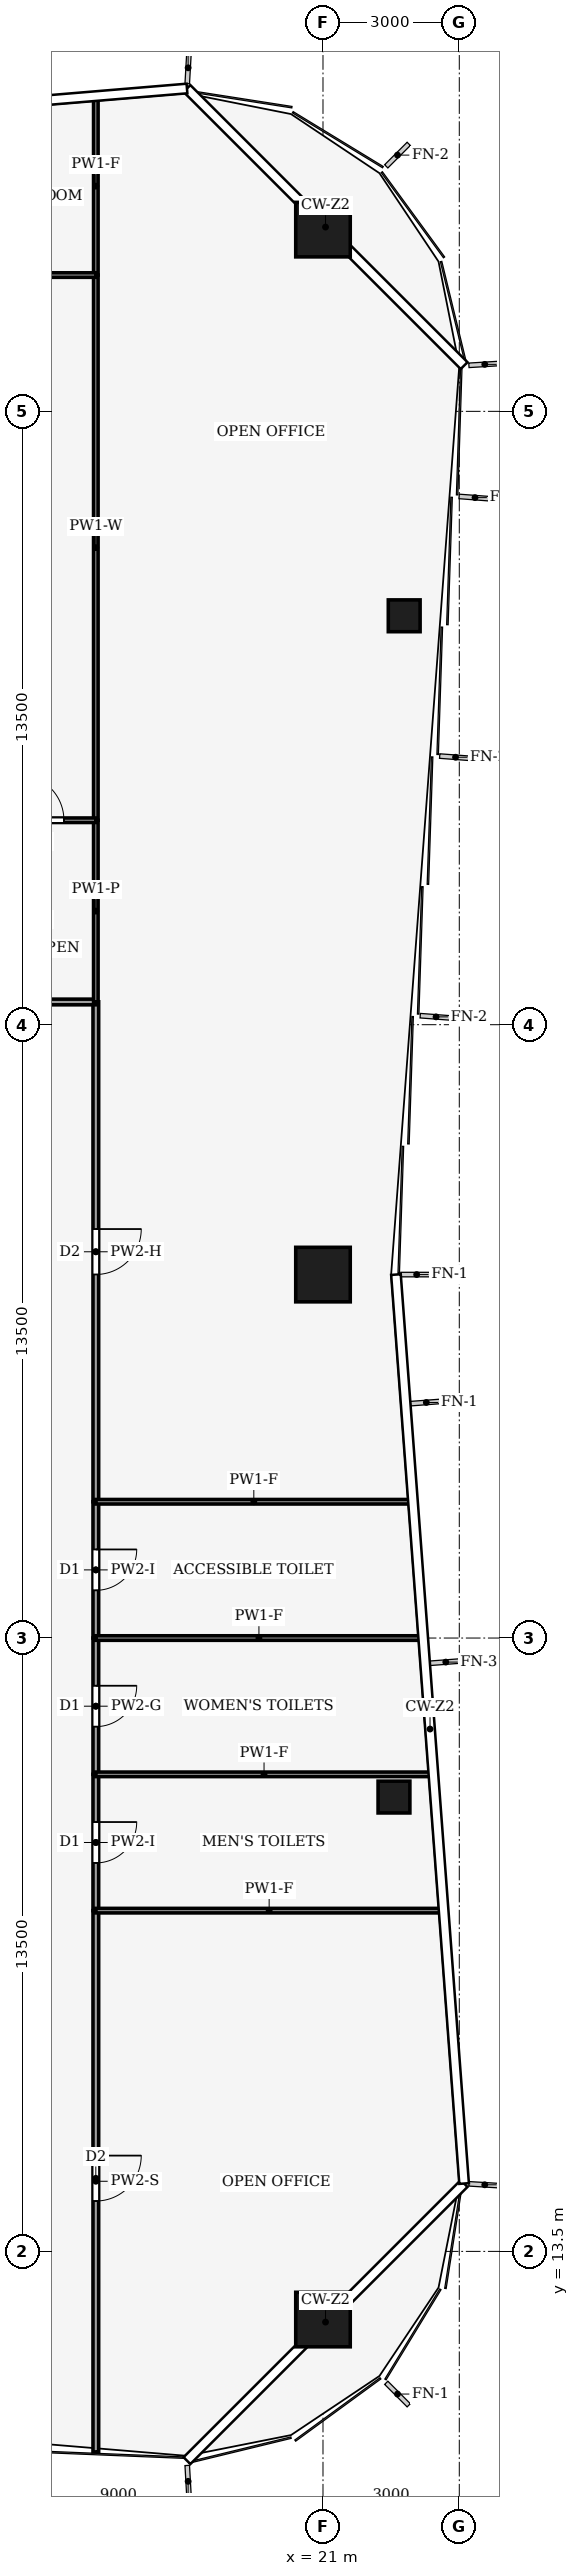
"""IFC4 building model, lengths in metres.
Left out: names, types, materials, properties, quantities, classifications, styles, units other than length and angle.
Written with IfcOpenShell. Run it as: python <this file> out.ifc"""

import sys

from ifc_helpers import new_model, si_unit, direction, frame, frame_2d, origin, origin_2d, place, context, subcontext, project, spatial, rectangle, hollow_rectangle, extrude, element, fill, save


model = new_model("IFC4")
c1 = context("Model", 3, precision=1e-05, world=origin(), true_north=direction((0.0, 1.0)))
c2 = subcontext(c1, "Body", "Model", "MODEL_VIEW")
j1 = project(units=[si_unit("LENGTHUNIT", "METRE"), si_unit("PLANEANGLEUNIT", "RADIAN")], contexts=[c1])
p1 = place(None, origin())
s1 = spatial("IfcSite", under=j1, at=p1, CompositionType="ELEMENT")
p2 = place(p1, origin())
s2 = spatial("IfcBuilding", under=s1, at=p2, CompositionType="ELEMENT")
p3 = place(p2, frame((0.0, 0.0, 138.0)))
s3 = spatial("IfcBuildingStorey", under=s2, at=p3, CompositionType="ELEMENT", Elevation=138.0)
for number, where, z_axis, x_axis in (
    (1, (21.0, 58.0, 0.0), (0.0, 0.0, 1.0), (1.0, 0.0, 0.0)),
    (2, (21.0, 35.0, 0.0), (0.0, 0.0, 1.0), (1.0, 0.0, 0.0)),
    (3, (21.0, 12.0, 0.0), (0.0, 0.0, 1.0), (1.0, 0.0, 0.0)),
):
    element("IfcColumn", number, at=place(p3, frame(where, z_axis=z_axis, x_axis=x_axis)), inside=s3, PredefinedType="COLUMN", context=c2, shape_type="SweptSolid", body=[
        extrude(hollow_rectangle(XDim=1.2, YDim=1.2, WallThickness=0.07, at=origin_2d()), origin(), (0.0, 0.0, 1.0), 4.0),
    ])
for number, where, z_axis, x_axis in (
    (4, (22.562, 23.5, 0.0), (0.0, 0.0, 1.0), (1.0, 0.0, 0.0)),
    (5, (22.788, 49.5, 0.0), (0.0, 0.0, 1.0), (1.0, 0.0, 0.0)),
):
    element("IfcColumn", number, at=place(p3, frame(where, z_axis=z_axis, x_axis=x_axis)), inside=s3, PredefinedType="COLUMN", context=c2, shape_type="SweptSolid", body=[
        extrude(hollow_rectangle(XDim=0.7, YDim=0.7, WallThickness=0.03, at=origin_2d()), origin(), (0.0, 0.0, 1.0), 4.0),
    ])
p4 = place(p3, frame((16.0, 21.0, 0.0), z_axis=(0.0, 0.0, 1.0), x_axis=(0.0, -1.0, 0.0)))
e6 = element("IfcWall", 6, at=p4, inside=s3, PredefinedType="PARTITIONING", context=c2, shape_type="SweptSolid", body=[
    extrude(rectangle(XDim=11.913, YDim=0.125, at=frame_2d((5.957, 0.0))), origin(), (0.0, 0.0, 1.0), 3.04),
])
p5 = place(p4, frame((5.392, 0.0, 0.0)))
e7 = element("IfcOpeningElement", 7, at=p5, cuts=e6, PredefinedType="OPENING", context=c2, shape_type="SweptSolid", body=[
    extrude(rectangle(XDim=1.0, YDim=2.1, at=frame_2d((0.5, 1.05))), frame((0.0, 0.073, 0.0), z_axis=(0.0, -1.0, 0.0), x_axis=(1.0, 0.0, 0.0)), (0.0, 0.0, 1.0), 0.145),
])
p6 = place(p3, frame((16.0, 24.0, 0.0), z_axis=(0.0, 0.0, 1.0), x_axis=(0.0, -1.0, 0.0)))
e8 = element("IfcWall", 8, at=p6, inside=s3, PredefinedType="PARTITIONING", context=c2, shape_type="SweptSolid", body=[
    extrude(rectangle(XDim=3.0, YDim=0.125, at=frame_2d((1.5, 0.0))), origin(), (0.0, 0.0, 1.0), 3.48),
])
p7 = place(p6, frame((1.05, 0.0, 0.0)))
e9 = element("IfcOpeningElement", 9, at=p7, cuts=e8, PredefinedType="OPENING", context=c2, shape_type="SweptSolid", body=[
    extrude(rectangle(XDim=0.9, YDim=2.1, at=frame_2d((0.45, 1.05))), frame((0.0, 0.073, 0.0), z_axis=(0.0, -1.0, 0.0), x_axis=(1.0, 0.0, 0.0)), (0.0, 0.0, 1.0), 0.145),
])
p8 = place(p3, frame((16.0, 27.0, 0.0), z_axis=(0.0, 0.0, 1.0), x_axis=(0.0, -1.0, 0.0)))
e10 = element("IfcWall", 10, at=p8, inside=s3, PredefinedType="PARTITIONING", context=c2, shape_type="SweptSolid", body=[
    extrude(rectangle(XDim=3.0, YDim=0.125, at=frame_2d((1.5, 0.0))), origin(), (0.0, 0.0, 1.0), 3.87),
])
p9 = place(p8, frame((1.05, 0.0, 0.0)))
e11 = element("IfcOpeningElement", 11, at=p9, cuts=e10, PredefinedType="OPENING", context=c2, shape_type="SweptSolid", body=[
    extrude(rectangle(XDim=0.9, YDim=2.1, at=frame_2d((0.45, 1.05))), frame((0.0, 0.073, 0.0), z_axis=(0.0, -1.0, 0.0), x_axis=(1.0, 0.0, 0.0)), (0.0, 0.0, 1.0), 0.145),
])
p10 = place(p3, frame((16.0, 30.0, 0.0), z_axis=(0.0, 0.0, 1.0), x_axis=(0.0, -1.0, 0.0)))
e12 = element("IfcWall", 12, at=p10, inside=s3, PredefinedType="PARTITIONING", context=c2, shape_type="SweptSolid", body=[
    extrude(rectangle(XDim=3.0, YDim=0.125, at=frame_2d((1.5, 0.0))), origin(), (0.0, 0.0, 1.0), 3.48),
])
p11 = place(p10, frame((1.05, 0.0, 0.0)))
e13 = element("IfcOpeningElement", 13, at=p11, cuts=e12, PredefinedType="OPENING", context=c2, shape_type="SweptSolid", body=[
    extrude(rectangle(XDim=0.9, YDim=2.1, at=frame_2d((0.45, 1.05))), frame((0.0, 0.073, 0.0), z_axis=(0.0, -1.0, 0.0), x_axis=(1.0, 0.0, 0.0)), (0.0, 0.0, 1.0), 0.145),
])
p12 = place(p3, frame((16.0, 41.004, 0.0), z_axis=(0.0, 0.0, 1.0), x_axis=(0.0, -1.0, 0.0)))
e14 = element("IfcWall", 14, at=p12, inside=s3, PredefinedType="PARTITIONING", context=c2, shape_type="SweptSolid", body=[
    extrude(rectangle(XDim=11.004, YDim=0.125, at=frame_2d((5.502, 0.0))), origin(), (0.0, 0.0, 1.0), 3.14),
])
p13 = place(p12, frame((5.002, 0.0, 0.0)))
e15 = element("IfcOpeningElement", 15, at=p13, cuts=e14, PredefinedType="OPENING", context=c2, shape_type="SweptSolid", body=[
    extrude(rectangle(XDim=1.0, YDim=2.1, at=frame_2d((0.5, 1.05))), frame((0.0, 0.073, 0.0), z_axis=(0.0, -1.0, 0.0), x_axis=(1.0, 0.0, 0.0)), (0.0, 0.0, 1.0), 0.145),
])
p14 = place(p3, frame((12.0, 41.0, 0.0), z_axis=(0.0, 0.0, 1.0), x_axis=(1.0, 0.0, 0.0)))
e16 = element("IfcWall", 16, at=p14, inside=s3, PredefinedType="PARTITIONING", context=c2, shape_type="SweptSolid", body=[
    extrude(rectangle(XDim=4.0, YDim=0.125, at=frame_2d((2.0, 0.0))), origin(), (0.0, 0.0, 1.0), 3.44),
])
p15 = place(p14, frame((1.5, 0.0, 0.0)))
e17 = element("IfcOpeningElement", 17, at=p15, cuts=e16, PredefinedType="OPENING", context=c2, shape_type="SweptSolid", body=[
    extrude(rectangle(XDim=1.0, YDim=2.1, at=frame_2d((0.5, 1.05))), frame((0.0, 0.073, 0.0), z_axis=(0.0, -1.0, 0.0), x_axis=(1.0, 0.0, 0.0)), (0.0, 0.0, 1.0), 0.145),
])
p16 = place(p3, frame((23.63, 21.0, 0.0), z_axis=(0.0, 0.0, 1.0), x_axis=(-1.0, 0.0, 0.0)))
e18 = element("IfcWall", 18, at=p16, inside=s3, PredefinedType="PARTITIONING", context=c2, shape_type="SweptSolid", body=[
    extrude(rectangle(XDim=7.63, YDim=0.1, at=frame_2d((3.815, 0.0))), origin(), (0.0, 0.0, 1.0), 3.04),
])
p17 = place(p3, frame((23.405, 24.0, 0.0), z_axis=(0.0, 0.0, 1.0), x_axis=(-1.0, 0.0, 0.0)))
e19 = element("IfcWall", 19, at=p17, inside=s3, PredefinedType="PARTITIONING", context=c2, shape_type="SweptSolid", body=[
    extrude(rectangle(XDim=7.405, YDim=0.1, at=frame_2d((3.703, 0.0))), origin(), (0.0, 0.0, 1.0), 3.04),
])
p18 = place(p3, frame((23.18, 27.0, 0.0), z_axis=(0.0, 0.0, 1.0), x_axis=(-1.0, 0.0, 0.0)))
e20 = element("IfcWall", 20, at=p18, inside=s3, PredefinedType="PARTITIONING", context=c2, shape_type="SweptSolid", body=[
    extrude(rectangle(XDim=7.18, YDim=0.1, at=frame_2d((3.59, 0.0))), origin(), (0.0, 0.0, 1.0), 3.04),
])
p19 = place(p3, frame((22.955, 30.0, 0.0), z_axis=(0.0, 0.0, 1.0), x_axis=(-1.0, 0.0, 0.0)))
e21 = element("IfcWall", 21, at=p19, inside=s3, PredefinedType="PARTITIONING", context=c2, shape_type="SweptSolid", body=[
    extrude(rectangle(XDim=6.955, YDim=0.1, at=frame_2d((3.478, 0.0))), origin(), (0.0, 0.0, 1.0), 3.04),
])
p20 = place(p3, frame((16.0, 45.0, 0.0), z_axis=(0.0, 0.0, 1.0), x_axis=(0.0, -1.0, 0.0)))
e22 = element("IfcWall", 22, at=p20, inside=s3, PredefinedType="PARTITIONING", context=c2, shape_type="SweptSolid", body=[
    extrude(rectangle(XDim=4.0, YDim=0.1, at=frame_2d((2.0, 0.0))), origin(), (0.0, 0.0, 1.0), 3.44),
])
p21 = place(p3, frame((16.0, 57.0, 0.0), z_axis=(0.0, 0.0, 1.0), x_axis=(0.0, -1.0, 0.0)))
e23 = element("IfcWall", 23, at=p21, inside=s3, PredefinedType="PARTITIONING", context=c2, shape_type="SweptSolid", body=[
    extrude(rectangle(XDim=12.0, YDim=0.1, at=frame_2d((6.0, 0.0))), origin(), (0.0, 0.0, 1.0), 3.24),
])
p22 = place(p3, frame((16.0, 60.913, 0.0), z_axis=(0.0, 0.0, 1.0), x_axis=(0.0, -1.0, 0.0)))
e24 = element("IfcWall", 24, at=p22, inside=s3, PredefinedType="PARTITIONING", context=c2, shape_type="SweptSolid", body=[
    extrude(rectangle(XDim=3.913, YDim=0.1, at=frame_2d((1.957, 0.0))), origin(), (0.0, 0.0, 1.0), 3.04),
])
p23 = place(p3, frame((11.996, 45.0, 0.0), z_axis=(0.0, 0.0, 1.0), x_axis=(1.0, 0.0, 0.0)))
e25 = element("IfcWall", 25, at=p23, inside=s3, PredefinedType="PARTITIONING", context=c2, shape_type="SweptSolid", body=[
    extrude(rectangle(XDim=4.004, YDim=0.1, at=frame_2d((2.002, 0.0))), origin(), (0.0, 0.0, 1.0), 3.87),
])
p24 = place(p23, frame((2.302, 0.0, 0.0)))
e26 = element("IfcOpeningElement", 26, at=p24, cuts=e25, PredefinedType="OPENING", context=c2, shape_type="SweptSolid", body=[
    extrude(rectangle(XDim=1.0, YDim=2.1, at=frame_2d((0.5, 1.05))), frame((0.0, 0.06, 0.0), z_axis=(0.0, -1.0, 0.0), x_axis=(1.0, 0.0, 0.0)), (0.0, 0.0, 1.0), 0.12),
])
p25 = place(p3, frame((6.0, 57.0, 0.0), z_axis=(0.0, 0.0, 1.0), x_axis=(1.0, 0.0, 0.0)))
e27 = element("IfcWall", 27, at=p25, inside=s3, PredefinedType="PARTITIONING", context=c2, shape_type="SweptSolid", body=[
    extrude(rectangle(XDim=10.0, YDim=0.1, at=frame_2d((5.0, 0.0))), origin(), (0.0, 0.0, 1.0), 3.44),
])
p26 = place(p25, frame((2.5, 0.0, 0.0)))
e28 = element("IfcOpeningElement", 28, at=p26, cuts=e27, PredefinedType="OPENING", context=c2, shape_type="SweptSolid", body=[
    extrude(rectangle(XDim=1.0, YDim=2.1, at=frame_2d((0.5, 1.05))), frame((0.0, 0.06, 0.0), z_axis=(0.0, -1.0, 0.0), x_axis=(1.0, 0.0, 0.0)), (0.0, 0.0, 1.0), 0.12),
])
p27 = place(p5, origin())
e29 = element("IfcDoor", 29, at=p27, inside=s3, OperationType="SINGLE_SWING_LEFT", PredefinedType="DOOR", context=c2, shape_type="SweptSolid", body=[
    extrude(rectangle(XDim=1.0, YDim=2.1, at=frame_2d((0.5, 1.05))), frame((0.0, 0.025, 0.0), z_axis=(0.0, -1.0, 0.0), x_axis=(1.0, 0.0, 0.0)), (0.0, 0.0, 1.0), 0.05),
])
fill(e7, e29)
p28 = place(p7, origin())
e30 = element("IfcDoor", 30, at=p28, inside=s3, OperationType="SINGLE_SWING_LEFT", PredefinedType="DOOR", context=c2, shape_type="SweptSolid", body=[
    extrude(rectangle(XDim=0.9, YDim=2.1, at=frame_2d((0.45, 1.05))), frame((0.0, 0.025, 0.0), z_axis=(0.0, -1.0, 0.0), x_axis=(1.0, 0.0, 0.0)), (0.0, 0.0, 1.0), 0.05),
])
fill(e9, e30)
p29 = place(p9, origin())
e31 = element("IfcDoor", 31, at=p29, inside=s3, OperationType="SINGLE_SWING_RIGHT", PredefinedType="DOOR", context=c2, shape_type="SweptSolid", body=[
    extrude(rectangle(XDim=0.9, YDim=2.1, at=frame_2d((0.45, 1.05))), frame((0.0, 0.025, 0.0), z_axis=(0.0, -1.0, 0.0), x_axis=(1.0, 0.0, 0.0)), (0.0, 0.0, 1.0), 0.05),
])
fill(e11, e31)
p30 = place(p11, origin())
e32 = element("IfcDoor", 32, at=p30, inside=s3, OperationType="SINGLE_SWING_LEFT", PredefinedType="DOOR", context=c2, shape_type="SweptSolid", body=[
    extrude(rectangle(XDim=0.9, YDim=2.1, at=frame_2d((0.45, 1.05))), frame((0.0, 0.025, 0.0), z_axis=(0.0, -1.0, 0.0), x_axis=(1.0, 0.0, 0.0)), (0.0, 0.0, 1.0), 0.05),
])
fill(e13, e32)
p31 = place(p13, origin())
e33 = element("IfcDoor", 33, at=p31, inside=s3, OperationType="SINGLE_SWING_RIGHT", PredefinedType="DOOR", context=c2, shape_type="SweptSolid", body=[
    extrude(rectangle(XDim=1.0, YDim=2.1, at=frame_2d((0.5, 1.05))), frame((0.0, 0.025, 0.0), z_axis=(0.0, -1.0, 0.0), x_axis=(1.0, 0.0, 0.0)), (0.0, 0.0, 1.0), 0.05),
])
fill(e15, e33)
p32 = place(p24, origin())
e34 = element("IfcDoor", 34, at=p32, inside=s3, OperationType="SINGLE_SWING_RIGHT", PredefinedType="DOOR", context=c2, shape_type="SweptSolid", body=[
    extrude(rectangle(XDim=1.0, YDim=2.1, at=frame_2d((0.5, 1.05))), frame((0.0, 0.025, 0.0), z_axis=(0.0, -1.0, 0.0), x_axis=(1.0, 0.0, 0.0)), (0.0, 0.0, 1.0), 0.05),
])
fill(e26, e34)
save(model, sys.argv[1])
